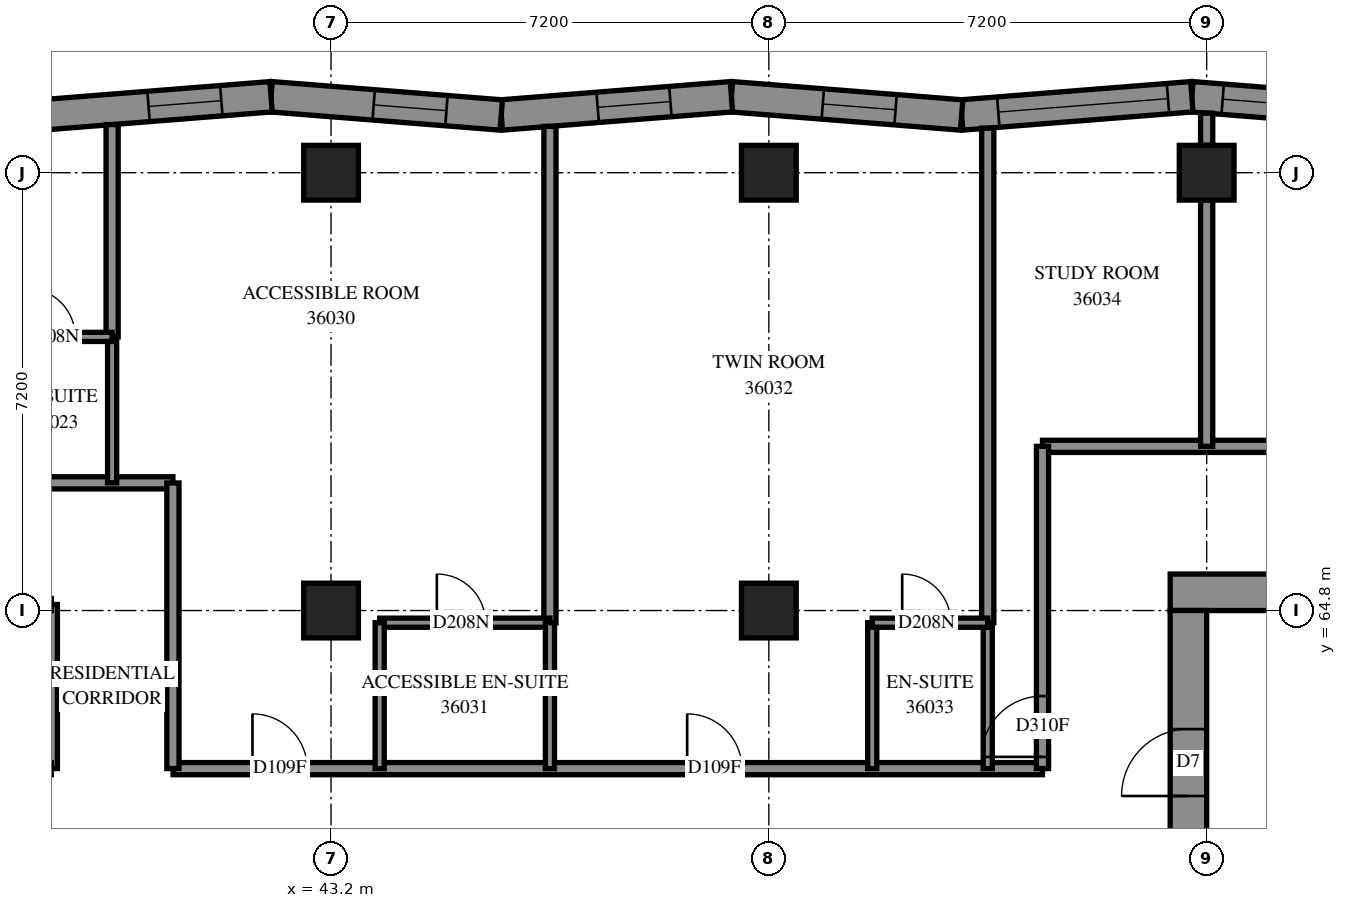
"""IFC4 building model, lengths in metres.
Left out: names, types, materials, properties, quantities, classifications, styles, units other than length and angle.
Written with IfcOpenShell. Run it as: python <this file> out.ifc"""

import sys

from ifc_helpers import new_model, si_unit, direction, frame, frame_2d, origin, origin_2d, place, context, subcontext, project, spatial, polyline, rectangle, outline, extrude, element, fill, save


model = new_model("IFC4")
c1 = context("Model", 3, precision=1e-05, world=origin(), true_north=direction((0.0, 1.0)))
c2 = subcontext(c1, "Body", "Model", "MODEL_VIEW")
j1 = project(units=[si_unit("LENGTHUNIT", "METRE"), si_unit("PLANEANGLEUNIT", "RADIAN")], contexts=[c1])
p1 = place(None, origin())
s1 = spatial("IfcSite", under=j1, at=p1, CompositionType="ELEMENT")
p2 = place(p1, origin())
s2 = spatial("IfcBuilding", under=s1, at=p2, CompositionType="ELEMENT")
p3 = place(p2, frame((0.0, 0.0, 135.4)))
s3 = spatial("IfcBuildingStorey", under=s2, at=p3, CompositionType="ELEMENT", Elevation=135.4)
for number, where, z_axis, x_axis in (
    (1, (43.2, 64.8, 0.0), (0.0, 0.0, 1.0), (1.0, 0.0, 0.0)),
    (2, (43.2, 72.0, 0.0), (0.0, 0.0, 1.0), (1.0, 0.0, 0.0)),
    (3, (50.4, 64.8, 0.0), (0.0, 0.0, 1.0), (1.0, 0.0, 0.0)),
    (4, (50.4, 72.0, 0.0), (0.0, 0.0, 1.0), (1.0, 0.0, 0.0)),
    (5, (57.6, 72.0, 0.0), (0.0, 0.0, 1.0), (1.0, 0.0, 0.0)),
):
    element("IfcColumn", number, at=place(p3, frame(where, z_axis=z_axis, x_axis=x_axis)), inside=s3, PredefinedType="COLUMN", context=c2, shape_type="SweptSolid", body=[
        extrude(rectangle(XDim=0.9, YDim=0.9, at=origin_2d()), origin(), (0.0, 0.0, 1.0), 3.1),
    ])
p4 = place(p3, frame((57.0, 65.1, -0.3), z_axis=(0.0, 0.0, 1.0), x_axis=(1.0, 0.0, 0.0)))
e6 = element("IfcWall", 6, at=p4, inside=s3, PredefinedType="SHEAR", context=c2, shape_type="SweptSolid", body=[
    extrude(rectangle(XDim=15.6, YDim=0.6, at=frame_2d((7.8, 0.0))), origin(), (0.0, 0.0, 1.0), 2.7),
])
p5 = place(p4, frame((10.6, 0.0, 0.3)))
e7 = element("IfcOpeningElement", 7, at=p5, cuts=e6, PredefinedType="OPENING", context=c2, shape_type="SweptSolid", body=[
    extrude(rectangle(XDim=0.8, YDim=2.1, at=frame_2d((0.4, 1.05))), frame((0.0, 0.31, 0.0), z_axis=(0.0, -1.0, 0.0), x_axis=(1.0, 0.0, 0.0)), (0.0, 0.0, 1.0), 0.62),
])
p6 = place(p3, frame((57.3, 50.4, -0.3), z_axis=(0.0, 0.0, 1.0), x_axis=(0.0, 1.0, 0.0)))
e8 = element("IfcWall", 8, at=p6, inside=s3, PredefinedType="SHEAR", context=c2, shape_type="SweptSolid", body=[
    extrude(rectangle(XDim=14.4, YDim=0.6, at=frame_2d((7.2, 0.0))), origin(), (0.0, 0.0, 1.0), 2.7),
])
p7 = place(p6, frame((4.55, 0.0, 0.3)))
e9 = element("IfcOpeningElement", 9, at=p7, cuts=e8, PredefinedType="OPENING", context=c2, shape_type="SweptSolid", body=[
    extrude(rectangle(XDim=1.1, YDim=2.1, at=frame_2d((0.55, 1.05))), frame((0.0, 0.31, 0.0), z_axis=(0.0, -1.0, 0.0), x_axis=(1.0, 0.0, 0.0)), (0.0, 0.0, 1.0), 0.62),
])
p8 = place(p6, frame((11.35, 0.0, 0.3)))
e10 = element("IfcOpeningElement", 10, at=p8, cuts=e8, PredefinedType="OPENING", context=c2, shape_type="SweptSolid", body=[
    extrude(rectangle(XDim=1.1, YDim=2.1, at=frame_2d((0.55, 1.05))), frame((0.0, 0.31, 0.0), z_axis=(0.0, -1.0, 0.0), x_axis=(1.0, 0.0, 0.0)), (0.0, 0.0, 1.0), 0.62),
])
p9 = place(p3, frame((61.142, 72.949, 0.0), z_axis=(0.0, 0.0, 1.0), x_axis=(-0.9968746163, 0.078999996, 0.0)))
e11 = element("IfcWall", 11, at=p9, inside=s3, PredefinedType="SOLIDWALL", context=c2, shape_type="SweptSolid", body=[
    extrude(outline(polyline([(0.02, -0.25), (3.817, -0.25), (3.778, 0.25), (-0.02, 0.25), (0.02, -0.25)])), origin(), (0.0, 0.0, 1.0), 3.1),
])
p10 = place(p9, frame((0.489, 0.0, 0.45)))
e12 = element("IfcOpeningElement", 12, at=p10, cuts=e11, PredefinedType="OPENING", context=c2, shape_type="SweptSolid", body=[
    extrude(rectangle(XDim=2.8, YDim=2.5, at=frame_2d((1.4, 1.25))), frame((0.0, 0.26, 0.0), z_axis=(0.0, -1.0, 0.0), x_axis=(1.0, 0.0, 0.0)), (0.0, 0.0, 1.0), 0.52),
])
p11 = place(p3, frame((57.356, 73.249, 0.0), z_axis=(0.0, 0.0, 1.0), x_axis=(-0.9968746163, -0.078999996, 0.0)))
e13 = element("IfcWall", 13, at=p11, inside=s3, PredefinedType="SOLIDWALL", context=c2, shape_type="SweptSolid", body=[
    extrude(outline(polyline([(-0.02, -0.25), (3.778, -0.25), (3.817, 0.25), (0.02, 0.25), (-0.02, -0.25)])), origin(), (0.0, 0.0, 1.0), 3.1),
])
p12 = place(p11, frame((0.393, 0.0, 0.45)))
e14 = element("IfcOpeningElement", 14, at=p12, cuts=e13, PredefinedType="OPENING", context=c2, shape_type="SweptSolid", body=[
    extrude(rectangle(XDim=2.8, YDim=2.5, at=frame_2d((1.4, 1.25))), frame((0.0, 0.26, 0.0), z_axis=(0.0, -1.0, 0.0), x_axis=(1.0, 0.0, 0.0)), (0.0, 0.0, 1.0), 0.52),
])
p13 = place(p3, frame((53.571, 72.949, 0.0), z_axis=(0.0, 0.0, 1.0), x_axis=(-0.9968747806, 0.0789979222, 0.0)))
e15 = element("IfcWall", 15, at=p13, inside=s3, PredefinedType="SOLIDWALL", context=c2, shape_type="SweptSolid", body=[
    extrude(outline(polyline([(0.02, -0.25), (3.817, -0.25), (3.778, 0.25), (-0.02, 0.25), (0.02, -0.25)])), origin(), (0.0, 0.0, 1.0), 3.1),
])
p14 = place(p13, frame((1.09, 0.0, 0.45)))
e16 = element("IfcOpeningElement", 16, at=p14, cuts=e15, PredefinedType="OPENING", context=c2, shape_type="SweptSolid", body=[
    extrude(rectangle(XDim=1.2, YDim=2.5, at=frame_2d((0.6, 1.25))), frame((0.0, 0.26, 0.0), z_axis=(0.0, -1.0, 0.0), x_axis=(1.0, 0.0, 0.0)), (0.0, 0.0, 1.0), 0.52),
])
p15 = place(p3, frame((49.785, 73.249, 0.0), z_axis=(0.0, 0.0, 1.0), x_axis=(-0.9968746163, -0.078999996, 0.0)))
e17 = element("IfcWall", 17, at=p15, inside=s3, PredefinedType="SOLIDWALL", context=c2, shape_type="SweptSolid", body=[
    extrude(outline(polyline([(-0.02, -0.25), (3.778, -0.25), (3.817, 0.25), (0.02, 0.25), (-0.02, -0.25)])), origin(), (0.0, 0.0, 1.0), 3.1),
])
p16 = place(p15, frame((1.007, 0.0, 0.45)))
e18 = element("IfcOpeningElement", 18, at=p16, cuts=e17, PredefinedType="OPENING", context=c2, shape_type="SweptSolid", body=[
    extrude(rectangle(XDim=1.2, YDim=2.5, at=frame_2d((0.6, 1.25))), frame((0.0, 0.26, 0.0), z_axis=(0.0, -1.0, 0.0), x_axis=(1.0, 0.0, 0.0)), (0.0, 0.0, 1.0), 0.52),
])
p17 = place(p3, frame((45.999, 72.949, 0.0), z_axis=(0.0, 0.0, 1.0), x_axis=(-0.9968746163, 0.078999996, 0.0)))
e19 = element("IfcWall", 19, at=p17, inside=s3, PredefinedType="SOLIDWALL", context=c2, shape_type="SweptSolid", body=[
    extrude(outline(polyline([(0.02, -0.25), (3.817, -0.25), (3.778, 0.25), (-0.02, 0.25), (0.02, -0.25)])), origin(), (0.0, 0.0, 1.0), 3.1),
])
p18 = place(p17, frame((0.904, 0.0, 0.45)))
e20 = element("IfcOpeningElement", 20, at=p18, cuts=e19, PredefinedType="OPENING", context=c2, shape_type="SweptSolid", body=[
    extrude(rectangle(XDim=1.2, YDim=2.5, at=frame_2d((0.6, 1.25))), frame((0.0, 0.26, 0.0), z_axis=(0.0, -1.0, 0.0), x_axis=(1.0, 0.0, 0.0)), (0.0, 0.0, 1.0), 0.52),
])
p19 = place(p3, frame((42.214, 73.249, 0.0), z_axis=(0.0, 0.0, 1.0), x_axis=(-0.9968746163, -0.078999996, 0.0)))
e21 = element("IfcWall", 21, at=p19, inside=s3, PredefinedType="SOLIDWALL", context=c2, shape_type="SweptSolid", body=[
    extrude(outline(polyline([(-0.02, -0.25), (3.778, -0.25), (3.817, 0.25), (0.02, 0.25), (-0.02, -0.25)])), origin(), (0.0, 0.0, 1.0), 3.1),
])
p20 = place(p19, frame((0.821, 0.0, 0.45)))
e22 = element("IfcOpeningElement", 22, at=p20, cuts=e21, PredefinedType="OPENING", context=c2, shape_type="SweptSolid", body=[
    extrude(rectangle(XDim=1.2, YDim=2.5, at=frame_2d((0.6, 1.25))), frame((0.0, 0.26, 0.0), z_axis=(0.0, -1.0, 0.0), x_axis=(1.0, 0.0, 0.0)), (0.0, 0.0, 1.0), 0.52),
])
p21 = place(p3, frame((54.9, 67.5, 0.0), z_axis=(0.0, 0.0, 1.0), x_axis=(1.0, 0.0, 0.0)))
e23 = element("IfcWall", 23, at=p21, inside=s3, PredefinedType="PARTITIONING", context=c2, shape_type="SweptSolid", body=[
    extrude(rectangle(XDim=19.8, YDim=0.2, at=frame_2d((9.9, 0.0))), origin(), (0.0, 0.0, 1.0), 3.1),
])
p22 = place(p21, frame((6.562, 0.0, 0.0)))
e24 = element("IfcOpeningElement", 24, at=p22, cuts=e23, PredefinedType="OPENING", context=c2, shape_type="SweptSolid", body=[
    extrude(rectangle(XDim=1.0, YDim=2.1, at=frame_2d((0.5, 1.05))), frame((0.0, 0.11, 0.0), z_axis=(0.0, -1.0, 0.0), x_axis=(1.0, 0.0, 0.0)), (0.0, 0.0, 1.0), 0.22),
])
p23 = place(p21, frame((14.089, 0.0, 0.0)))
e25 = element("IfcOpeningElement", 25, at=p23, cuts=e23, PredefinedType="OPENING", context=c2, shape_type="SweptSolid", body=[
    extrude(rectangle(XDim=1.0, YDim=2.1, at=frame_2d((0.5, 1.05))), frame((0.0, 0.11, 0.0), z_axis=(0.0, -1.0, 0.0), x_axis=(1.0, 0.0, 0.0)), (0.0, 0.0, 1.0), 0.22),
])
p24 = place(p3, frame((21.6, 66.9, 0.0), z_axis=(0.0, 0.0, 1.0), x_axis=(1.0, 0.0, 0.0)))
e26 = element("IfcWall", 26, at=p24, inside=s3, PredefinedType="PARTITIONING", context=c2, shape_type="SweptSolid", body=[
    extrude(rectangle(XDim=19.0, YDim=0.2, at=frame_2d((9.5, 0.0))), origin(), (0.0, 0.0, 1.0), 3.1),
])
p25 = place(p24, frame((2.3, 0.0, 0.0)))
e27 = element("IfcOpeningElement", 27, at=p25, cuts=e26, PredefinedType="OPENING", context=c2, shape_type="SweptSolid", body=[
    extrude(rectangle(XDim=0.9, YDim=2.1, at=frame_2d((0.45, 1.05))), frame((0.0, 0.11, 0.0), z_axis=(0.0, -1.0, 0.0), x_axis=(1.0, 0.0, 0.0)), (0.0, 0.0, 1.0), 0.22),
])
p26 = place(p24, frame((5.957, 0.0, 0.0)))
e28 = element("IfcOpeningElement", 28, at=p26, cuts=e26, PredefinedType="OPENING", context=c2, shape_type="SweptSolid", body=[
    extrude(rectangle(XDim=0.9, YDim=2.1, at=frame_2d((0.45, 1.05))), frame((0.0, 0.11, 0.0), z_axis=(0.0, -1.0, 0.0), x_axis=(1.0, 0.0, 0.0)), (0.0, 0.0, 1.0), 0.22),
])
p27 = place(p24, frame((13.057, 0.0, 0.0)))
e29 = element("IfcOpeningElement", 29, at=p27, cuts=e26, PredefinedType="OPENING", context=c2, shape_type="SweptSolid", body=[
    extrude(rectangle(XDim=0.9, YDim=2.1, at=frame_2d((0.45, 1.05))), frame((0.0, 0.11, 0.0), z_axis=(0.0, -1.0, 0.0), x_axis=(1.0, 0.0, 0.0)), (0.0, 0.0, 1.0), 0.22),
])
p28 = place(p3, frame((40.602, 62.2, 0.0), z_axis=(0.0, 0.0, 1.0), x_axis=(1.0, 0.0, 0.0)))
e30 = element("IfcWall", 30, at=p28, inside=s3, PredefinedType="PARTITIONING", context=c2, shape_type="SweptSolid", body=[
    extrude(rectangle(XDim=14.298, YDim=0.2, at=frame_2d((7.149, 0.0))), origin(), (0.0, 0.0, 1.0), 3.1),
])
p29 = place(p28, frame((1.306, 0.0, 0.0)))
e31 = element("IfcOpeningElement", 31, at=p29, cuts=e30, PredefinedType="OPENING", context=c2, shape_type="SweptSolid", body=[
    extrude(rectangle(XDim=0.9, YDim=2.1, at=frame_2d((0.45, 1.05))), frame((0.0, 0.11, 0.0), z_axis=(0.0, -1.0, 0.0), x_axis=(1.0, 0.0, 0.0)), (0.0, 0.0, 1.0), 0.22),
])
p30 = place(p28, frame((8.455, 0.0, 0.0)))
e32 = element("IfcOpeningElement", 32, at=p30, cuts=e30, PredefinedType="OPENING", context=c2, shape_type="SweptSolid", body=[
    extrude(rectangle(XDim=0.9, YDim=2.1, at=frame_2d((0.45, 1.05))), frame((0.0, 0.11, 0.0), z_axis=(0.0, -1.0, 0.0), x_axis=(1.0, 0.0, 0.0)), (0.0, 0.0, 1.0), 0.22),
])
p31 = place(p3, frame((46.8, 64.6, 0.0), z_axis=(0.0, 0.0, 1.0), x_axis=(0.0, 1.0, 0.0)))
e33 = element("IfcWall", 33, at=p31, inside=s3, PredefinedType="PARTITIONING", context=c2, shape_type="SweptSolid", body=[
    extrude(rectangle(XDim=8.162, YDim=0.2, at=frame_2d((4.081, 0.0))), origin(), (0.0, 0.0, 1.0), 3.1),
])
p32 = place(p3, frame((54.0, 64.6, 0.0), z_axis=(0.0, 0.0, 1.0), x_axis=(0.0, 1.0, 0.0)))
e34 = element("IfcWall", 34, at=p32, inside=s3, PredefinedType="PARTITIONING", context=c2, shape_type="SweptSolid", body=[
    extrude(rectangle(XDim=8.133, YDim=0.2, at=frame_2d((4.066, 0.0))), origin(), (0.0, 0.0, 1.0), 3.1),
])
p33 = place(p3, frame((54.9, 62.202, 0.0), z_axis=(0.0, 0.0, 1.0), x_axis=(0.0, 1.0, 0.0)))
e35 = element("IfcWall", 35, at=p33, inside=s3, PredefinedType="PARTITIONING", context=c2, shape_type="SweptSolid", body=[
    extrude(rectangle(XDim=5.298, YDim=0.2, at=frame_2d((2.649, 0.0))), origin(), (0.0, 0.0, 1.0), 3.1),
])
p34 = place(p33, frame((0.192, 0.0, 0.0)))
e36 = element("IfcOpeningElement", 36, at=p34, cuts=e35, PredefinedType="OPENING", context=c2, shape_type="SweptSolid", body=[
    extrude(rectangle(XDim=1.0, YDim=2.1, at=frame_2d((0.5, 1.05))), frame((0.0, 0.11, 0.0), z_axis=(0.0, -1.0, 0.0), x_axis=(1.0, 0.0, 0.0)), (0.0, 0.0, 1.0), 0.22),
])
p35 = place(p3, frame((40.6, 62.202, 0.0), z_axis=(0.0, 0.0, 1.0), x_axis=(0.0, 1.0, 0.0)))
e37 = element("IfcWall", 37, at=p35, inside=s3, PredefinedType="PARTITIONING", context=c2, shape_type="SweptSolid", body=[
    extrude(rectangle(XDim=4.696, YDim=0.2, at=frame_2d((2.348, 0.0))), origin(), (0.0, 0.0, 1.0), 3.1),
])
p36 = place(p3, frame((57.6, 67.5, 0.0), z_axis=(0.0, 0.0, 1.0), x_axis=(0.0, 1.0, 0.0)))
e38 = element("IfcWall", 38, at=p36, inside=s3, PredefinedType="PARTITIONING", context=c2, shape_type="SweptSolid", body=[
    extrude(rectangle(XDim=4.05, YDim=0.2, at=frame_2d((2.025, 0.0))), origin(), (0.0, 0.0, 1.0), 3.1),
])
p37 = place(p3, frame((39.6, 69.3, 0.0), z_axis=(0.0, 0.0, 1.0), x_axis=(0.0, 1.0, 0.0)))
e39 = element("IfcWall", 39, at=p37, inside=s3, PredefinedType="PARTITIONING", context=c2, shape_type="SweptSolid", body=[
    extrude(rectangle(XDim=3.491, YDim=0.2, at=frame_2d((1.746, 0.0))), origin(), (0.0, 0.0, 1.0), 3.1),
])
p38 = place(p3, frame((44.0, 64.6, 0.0), z_axis=(0.0, 0.0, 1.0), x_axis=(1.0, 0.0, 0.0)))
e40 = element("IfcWall", 40, at=p38, inside=s3, PredefinedType="PARTITIONING", context=c2, shape_type="SweptSolid", body=[
    extrude(rectangle(XDim=2.8, YDim=0.15, at=frame_2d((1.4, 0.0))), origin(), (0.0, 0.0, 1.0), 3.1),
])
p39 = place(p38, frame((0.94, 0.0, 0.0)))
e41 = element("IfcOpeningElement", 41, at=p39, cuts=e40, PredefinedType="OPENING", context=c2, shape_type="SweptSolid", body=[
    extrude(rectangle(XDim=0.8, YDim=2.1, at=frame_2d((0.4, 1.05))), frame((0.0, 0.085, 0.0), z_axis=(0.0, -1.0, 0.0), x_axis=(1.0, 0.0, 0.0)), (0.0, 0.0, 1.0), 0.17),
])
p40 = place(p3, frame((38.6, 62.202, 0.0), z_axis=(0.0, 0.0, 1.0), x_axis=(0.0, 1.0, 0.0)))
e42 = element("IfcWall", 42, at=p40, inside=s3, PredefinedType="PARTITIONING", context=c2, shape_type="SweptSolid", body=[
    extrude(rectangle(XDim=2.698, YDim=0.2, at=frame_2d((1.349, 0.0))), origin(), (0.0, 0.0, 1.0), 3.1),
])
for number, where, z_axis, x_axis in (
    (43, (39.6, 66.9, 0.0), (0.0, 0.0, 1.0), (0.0, 1.0, 0.0)),
    (44, (44.0, 62.2, 0.0), (0.0, 0.0, 1.0), (0.0, 1.0, 0.0)),
    (45, (46.8, 62.2, 0.0), (0.0, 0.0, 1.0), (0.0, 1.0, 0.0)),
    (46, (52.1, 62.2, 0.0), (0.0, 0.0, 1.0), (0.0, 1.0, 0.0)),
    (47, (54.0, 62.2, 0.0), (0.0, 0.0, 1.0), (0.0, 1.0, 0.0)),
):
    element("IfcWall", number, at=place(p3, frame(where, z_axis=z_axis, x_axis=x_axis)), inside=s3, PredefinedType="PARTITIONING", context=c2, shape_type="SweptSolid", body=[
        extrude(rectangle(XDim=2.4, YDim=0.15, at=frame_2d((1.2, 0.0))), origin(), (0.0, 0.0, 1.0), 3.1),
    ])
p41 = place(p3, frame((37.7, 69.3, 0.0), z_axis=(0.0, 0.0, 1.0), x_axis=(1.0, 0.0, 0.0)))
e48 = element("IfcWall", 48, at=p41, inside=s3, PredefinedType="PARTITIONING", context=c2, shape_type="SweptSolid", body=[
    extrude(rectangle(XDim=1.9, YDim=0.15, at=frame_2d((0.95, 0.0))), origin(), (0.0, 0.0, 1.0), 3.1),
])
p42 = place(p41, frame((0.493, 0.0, 0.0)))
e49 = element("IfcOpeningElement", 49, at=p42, cuts=e48, PredefinedType="OPENING", context=c2, shape_type="SweptSolid", body=[
    extrude(rectangle(XDim=0.8, YDim=2.1, at=frame_2d((0.4, 1.05))), frame((0.0, 0.085, 0.0), z_axis=(0.0, -1.0, 0.0), x_axis=(1.0, 0.0, 0.0)), (0.0, 0.0, 1.0), 0.17),
])
p43 = place(p3, frame((52.1, 64.6, 0.0), z_axis=(0.0, 0.0, 1.0), x_axis=(1.0, 0.0, 0.0)))
e50 = element("IfcWall", 50, at=p43, inside=s3, PredefinedType="PARTITIONING", context=c2, shape_type="SweptSolid", body=[
    extrude(rectangle(XDim=1.9, YDim=0.15, at=frame_2d((0.95, 0.0))), origin(), (0.0, 0.0, 1.0), 3.1),
])
p44 = place(p43, frame((0.493, 0.0, 0.0)))
e51 = element("IfcOpeningElement", 51, at=p44, cuts=e50, PredefinedType="OPENING", context=c2, shape_type="SweptSolid", body=[
    extrude(rectangle(XDim=0.8, YDim=2.1, at=frame_2d((0.4, 1.05))), frame((0.0, 0.085, 0.0), z_axis=(0.0, -1.0, 0.0), x_axis=(1.0, 0.0, 0.0)), (0.0, 0.0, 1.0), 0.17),
])
p45 = place(p3, frame((57.6, 72.45, 0.0), z_axis=(0.0, 0.0, 1.0), x_axis=(0.0, 1.0, 0.0)))
e52 = element("IfcWall", 52, at=p45, inside=s3, PredefinedType="PARTITIONING", context=c2, shape_type="SweptSolid", body=[
    extrude(rectangle(XDim=0.529, YDim=0.2, at=frame_2d((0.265, 0.0))), origin(), (0.0, 0.0, 1.0), 3.1),
])
p46 = place(p10, origin())
e53 = element("IfcWindow", 53, at=p46, inside=s3, PartitioningType="SINGLE_PANEL", PredefinedType="WINDOW", context=c2, shape_type="SweptSolid", body=[
    extrude(rectangle(XDim=2.8, YDim=2.5, at=frame_2d((1.4, 1.25))), frame((0.0, 0.18, 0.0), z_axis=(0.0, -1.0, 0.0), x_axis=(1.0, 0.0, 0.0)), (0.0, 0.0, 1.0), 0.06),
])
fill(e12, e53)
p47 = place(p12, origin())
e54 = element("IfcWindow", 54, at=p47, inside=s3, PartitioningType="SINGLE_PANEL", PredefinedType="WINDOW", context=c2, shape_type="SweptSolid", body=[
    extrude(rectangle(XDim=2.8, YDim=2.5, at=frame_2d((1.4, 1.25))), frame((0.0, 0.18, 0.0), z_axis=(0.0, -1.0, 0.0), x_axis=(1.0, 0.0, 0.0)), (0.0, 0.0, 1.0), 0.06),
])
fill(e14, e54)
p48 = place(p14, origin())
e55 = element("IfcWindow", 55, at=p48, inside=s3, PartitioningType="SINGLE_PANEL", PredefinedType="WINDOW", context=c2, shape_type="SweptSolid", body=[
    extrude(rectangle(XDim=1.2, YDim=2.5, at=frame_2d((0.6, 1.25))), frame((0.0, 0.18, 0.0), z_axis=(0.0, -1.0, 0.0), x_axis=(1.0, 0.0, 0.0)), (0.0, 0.0, 1.0), 0.06),
])
fill(e16, e55)
p49 = place(p16, origin())
e56 = element("IfcWindow", 56, at=p49, inside=s3, PartitioningType="SINGLE_PANEL", PredefinedType="WINDOW", context=c2, shape_type="SweptSolid", body=[
    extrude(rectangle(XDim=1.2, YDim=2.5, at=frame_2d((0.6, 1.25))), frame((0.0, 0.18, 0.0), z_axis=(0.0, -1.0, 0.0), x_axis=(1.0, 0.0, 0.0)), (0.0, 0.0, 1.0), 0.06),
])
fill(e18, e56)
p50 = place(p18, origin())
e57 = element("IfcWindow", 57, at=p50, inside=s3, PartitioningType="SINGLE_PANEL", PredefinedType="WINDOW", context=c2, shape_type="SweptSolid", body=[
    extrude(rectangle(XDim=1.2, YDim=2.5, at=frame_2d((0.6, 1.25))), frame((0.0, 0.18, 0.0), z_axis=(0.0, -1.0, 0.0), x_axis=(1.0, 0.0, 0.0)), (0.0, 0.0, 1.0), 0.06),
])
fill(e20, e57)
p51 = place(p20, origin())
e58 = element("IfcWindow", 58, at=p51, inside=s3, PartitioningType="SINGLE_PANEL", PredefinedType="WINDOW", context=c2, shape_type="SweptSolid", body=[
    extrude(rectangle(XDim=1.2, YDim=2.5, at=frame_2d((0.6, 1.25))), frame((0.0, 0.18, 0.0), z_axis=(0.0, -1.0, 0.0), x_axis=(1.0, 0.0, 0.0)), (0.0, 0.0, 1.0), 0.06),
])
fill(e22, e58)
p52 = place(p8, origin())
e59 = element("IfcDoor", 59, at=p52, inside=s3, OperationType="SINGLE_SWING_LEFT", PredefinedType="DOOR", context=c2, shape_type="SweptSolid", body=[
    extrude(rectangle(XDim=1.1, YDim=2.1, at=frame_2d((0.55, 1.05))), frame((0.0, 0.025, 0.0), z_axis=(0.0, -1.0, 0.0), x_axis=(1.0, 0.0, 0.0)), (0.0, 0.0, 1.0), 0.05),
])
fill(e10, e59)
p53 = place(p42, origin())
e60 = element("IfcDoor", 60, at=p53, inside=s3, OperationType="SINGLE_SWING_RIGHT", PredefinedType="DOOR", context=c2, shape_type="SweptSolid", body=[
    extrude(rectangle(XDim=0.8, YDim=2.1, at=frame_2d((0.4, 1.05))), frame((0.0, 0.025, 0.0), z_axis=(0.0, -1.0, 0.0), x_axis=(1.0, 0.0, 0.0)), (0.0, 0.0, 1.0), 0.05),
])
fill(e49, e60)
p54 = place(p29, origin())
e61 = element("IfcDoor", 61, at=p54, inside=s3, OperationType="SINGLE_SWING_LEFT", PredefinedType="DOOR", context=c2, shape_type="SweptSolid", body=[
    extrude(rectangle(XDim=0.9, YDim=2.1, at=frame_2d((0.45, 1.05))), frame((0.0, 0.025, 0.0), z_axis=(0.0, -1.0, 0.0), x_axis=(1.0, 0.0, 0.0)), (0.0, 0.0, 1.0), 0.05),
])
fill(e31, e61)
p55 = place(p39, origin())
e62 = element("IfcDoor", 62, at=p55, inside=s3, OperationType="SINGLE_SWING_RIGHT", PredefinedType="DOOR", context=c2, shape_type="SweptSolid", body=[
    extrude(rectangle(XDim=0.8, YDim=2.1, at=frame_2d((0.4, 1.05))), frame((0.0, 0.025, 0.0), z_axis=(0.0, -1.0, 0.0), x_axis=(1.0, 0.0, 0.0)), (0.0, 0.0, 1.0), 0.05),
])
fill(e41, e62)
p56 = place(p30, origin())
e63 = element("IfcDoor", 63, at=p56, inside=s3, OperationType="SINGLE_SWING_LEFT", PredefinedType="DOOR", context=c2, shape_type="SweptSolid", body=[
    extrude(rectangle(XDim=0.9, YDim=2.1, at=frame_2d((0.45, 1.05))), frame((0.0, 0.025, 0.0), z_axis=(0.0, -1.0, 0.0), x_axis=(1.0, 0.0, 0.0)), (0.0, 0.0, 1.0), 0.05),
])
fill(e32, e63)
p57 = place(p44, origin())
e64 = element("IfcDoor", 64, at=p57, inside=s3, OperationType="SINGLE_SWING_RIGHT", PredefinedType="DOOR", context=c2, shape_type="SweptSolid", body=[
    extrude(rectangle(XDim=0.8, YDim=2.1, at=frame_2d((0.4, 1.05))), frame((0.0, 0.025, 0.0), z_axis=(0.0, -1.0, 0.0), x_axis=(1.0, 0.0, 0.0)), (0.0, 0.0, 1.0), 0.05),
])
fill(e51, e64)
p58 = place(p34, origin())
e65 = element("IfcDoor", 65, at=p58, inside=s3, OperationType="SINGLE_SWING_LEFT", PredefinedType="DOOR", context=c2, shape_type="SweptSolid", body=[
    extrude(rectangle(XDim=1.0, YDim=2.1, at=frame_2d((0.5, 1.05))), frame((0.0, 0.025, 0.0), z_axis=(0.0, -1.0, 0.0), x_axis=(1.0, 0.0, 0.0)), (0.0, 0.0, 1.0), 0.05),
])
fill(e36, e65)
save(model, sys.argv[1])
